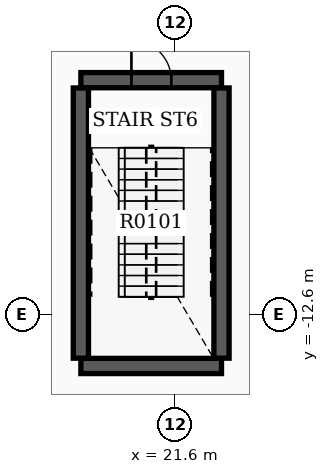
"""IFC4 building model, lengths in metres.
Left out: names, types, materials, properties, quantities, classifications, styles, units other than length and angle.
Written with IfcOpenShell. Run it as: python <this file> out.ifc"""

import sys

from ifc_helpers import new_model, si_unit, direction, frame, frame_2d, origin, place, context, subcontext, project, spatial, rectangle, extrude, element, fill, save


model = new_model("IFC4")
c1 = context("Model", 3, precision=1e-05, world=origin(), true_north=direction((0.0, 1.0)))
c2 = subcontext(c1, "Body", "Model", "MODEL_VIEW")
j1 = project(units=[si_unit("LENGTHUNIT", "METRE"), si_unit("PLANEANGLEUNIT", "RADIAN")], contexts=[c1])
p1 = place(None, origin())
s1 = spatial("IfcSite", under=j1, at=p1, CompositionType="ELEMENT")
p2 = place(p1, origin())
s2 = spatial("IfcBuilding", under=s1, at=p2, CompositionType="ELEMENT")
p3 = place(p2, origin())
s3 = spatial("IfcBuildingStorey", under=s2, at=p3, CompositionType="ELEMENT", Elevation=0.0)
p4 = place(p3, frame((19.12, -6.43, 0.0), z_axis=(0.0, 0.0, 1.0), x_axis=(1.0, 0.0, 0.0)))
e1 = element("IfcWall", 1, at=p4, inside=s3, PredefinedType="SHEAR", context=c2, shape_type="SweptSolid", body=[
    extrude(rectangle(XDim=3.7, YDim=0.4, at=frame_2d((1.85, 0.0))), origin(), (0.0, 0.0, 1.0), 5.15),
])
p5 = place(p4, frame((1.33, 0.0, 0.0)))
e2 = element("IfcOpeningElement", 2, at=p5, cuts=e1, PredefinedType="OPENING", context=c2, shape_type="SweptSolid", body=[
    extrude(rectangle(XDim=1.05, YDim=2.15, at=frame_2d((0.525, 1.075))), frame((0.0, 0.21, 0.0), z_axis=(0.0, -1.0, 0.0), x_axis=(1.0, 0.0, 0.0)), (0.0, 0.0, 1.0), 0.42),
])
p6 = place(p3, frame((19.12, -13.95, 0.0), z_axis=(0.0, 0.0, 1.0), x_axis=(1.0, 0.0, 0.0)))
e3 = element("IfcWall", 3, at=p6, inside=s3, PredefinedType="SHEAR", context=c2, shape_type="SweptSolid", body=[
    extrude(rectangle(XDim=3.7, YDim=0.4, at=frame_2d((1.85, 0.0))), origin(), (0.0, 0.0, 1.0), 5.15),
])
for number, where, z_axis, x_axis in (
    (4, (19.12, -13.745, 0.0), (0.0, 0.0, 1.0), (0.0, 1.0, 0.0)),
    (5, (22.82, -13.745, 0.0), (0.0, 0.0, 1.0), (0.0, 1.0, 0.0)),
):
    element("IfcWall", number, at=place(p3, frame(where, z_axis=z_axis, x_axis=x_axis)), inside=s3, PredefinedType="SHEAR", context=c2, shape_type="SweptSolid", body=[
        extrude(rectangle(XDim=7.11, YDim=0.4, at=frame_2d((3.555, 0.0))), origin(), (0.0, 0.0, 1.0), 5.15),
    ])
p7 = place(p5, origin())
e6 = element("IfcDoor", 6, at=p7, inside=s3, OperationType="SINGLE_SWING_LEFT", PredefinedType="DOOR", context=c2, shape_type="SweptSolid", body=[
    extrude(rectangle(XDim=1.05, YDim=2.15, at=frame_2d((0.525, 1.075))), frame((0.0, 0.025, 0.0), z_axis=(0.0, -1.0, 0.0), x_axis=(1.0, 0.0, 0.0)), (0.0, 0.0, 1.0), 0.05),
])
fill(e2, e6)
save(model, sys.argv[1])
